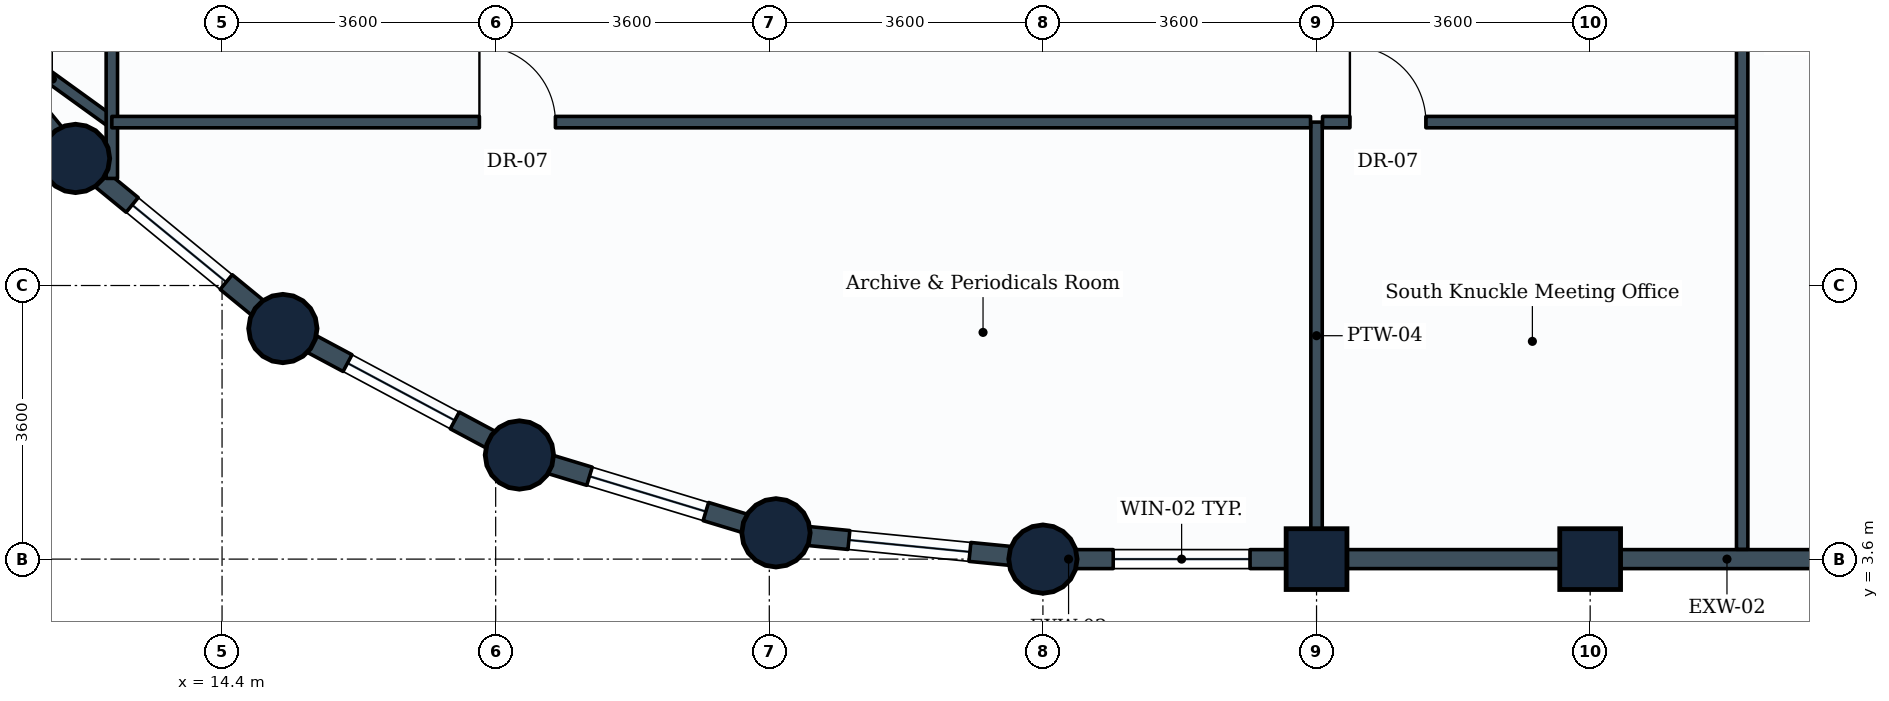
"""IFC4 building model, lengths in metres.
Left out: names, types, materials, properties, quantities, classifications, styles, units other than length and angle.
Written with IfcOpenShell. Run it as: python <this file> out.ifc"""

import sys

from ifc_helpers import new_model, si_unit, direction, frame, frame_2d, origin, origin_2d, place, context, subcontext, project, spatial, rectangle, circle, extrude, element, fill, save


model = new_model("IFC4")
c1 = context("Model", 3, precision=1e-05, world=origin(), true_north=direction((0.0, 1.0)))
c2 = subcontext(c1, "Body", "Model", "MODEL_VIEW")
j1 = project(units=[si_unit("LENGTHUNIT", "METRE"), si_unit("PLANEANGLEUNIT", "RADIAN")], contexts=[c1])
p1 = place(None, origin())
s1 = spatial("IfcSite", under=j1, at=p1, CompositionType="ELEMENT")
p2 = place(p1, origin())
s2 = spatial("IfcBuilding", under=s1, at=p2, CompositionType="ELEMENT")
p3 = place(p2, frame((0.0, 0.0, 259.4)))
s3 = spatial("IfcBuildingStorey", under=s2, at=p3, CompositionType="ELEMENT", Elevation=259.4)
for number, where, z_axis, x_axis in (
    (1, (12.472, 8.872, 0.0), (0.0, 0.0, 1.0), (1.0, 0.0, 0.0)),
    (2, (15.2, 6.634, 0.0), (0.0, 0.0, 1.0), (1.0, 0.0, 0.0)),
    (3, (18.312, 4.97, 0.0), (0.0, 0.0, 1.0), (1.0, 0.0, 0.0)),
    (4, (21.688, 3.946, 0.0), (0.0, 0.0, 1.0), (1.0, 0.0, 0.0)),
    (5, (25.2, 3.6, 0.0), (0.0, 0.0, 1.0), (1.0, 0.0, 0.0)),
):
    element("IfcColumn", number, at=place(p3, frame(where, z_axis=z_axis, x_axis=x_axis)), inside=s3, PredefinedType="COLUMN", context=c2, shape_type="SweptSolid", body=[
        extrude(circle(Radius=0.45, at=origin_2d()), origin(), (0.0, 0.0, 1.0), 3.6),
    ])
for number, where, z_axis, x_axis in (
    (6, (28.8, 3.6, 0.0), (0.0, 0.0, 1.0), (1.0, 0.0, 0.0)),
    (7, (32.4, 3.6, 0.0), (0.0, 0.0, 1.0), (1.0, 0.0, 0.0)),
):
    element("IfcColumn", number, at=place(p3, frame(where, z_axis=z_axis, x_axis=x_axis)), inside=s3, PredefinedType="COLUMN", context=c2, shape_type="SweptSolid", body=[
        extrude(rectangle(XDim=0.8, YDim=0.8, at=origin_2d()), origin(), (0.0, 0.0, 1.0), 3.6),
    ])
p4 = place(p3, frame((28.8, 3.6, 0.0), z_axis=(0.0, 0.0, 1.0), x_axis=(-1.0, 0.0, 0.0)))
e8 = element("IfcWall", 8, at=p4, inside=s3, PredefinedType="STANDARD", context=c2, shape_type="SweptSolid", body=[
    extrude(rectangle(XDim=3.6, YDim=0.25, at=frame_2d((1.8, 0.0))), origin(), (0.0, 0.0, 1.0), 2.83),
])
p5 = place(p4, frame((0.875, 0.0, 0.85)))
e9 = element("IfcOpeningElement", 9, at=p5, cuts=e8, PredefinedType="OPENING", context=c2, shape_type="SweptSolid", body=[
    extrude(rectangle(XDim=1.8, YDim=1.35, at=frame_2d((0.9, 0.675))), frame((0.0, 0.135, 0.0), z_axis=(0.0, -1.0, 0.0), x_axis=(1.0, 0.0, 0.0)), (0.0, 0.0, 1.0), 0.27),
])
p6 = place(p3, frame((32.4, 3.6, 0.0), z_axis=(0.0, 0.0, 1.0), x_axis=(-1.0, 0.0, 0.0)))
e10 = element("IfcWall", 10, at=p6, inside=s3, PredefinedType="STANDARD", context=c2, shape_type="SweptSolid", body=[
    extrude(rectangle(XDim=3.6, YDim=0.25, at=frame_2d((1.8, 0.0))), origin(), (0.0, 0.0, 1.0), 2.83),
])
p7 = place(p3, frame((36.0, 3.6, 0.0), z_axis=(0.0, 0.0, 1.0), x_axis=(-1.0, 0.0, 0.0)))
e11 = element("IfcWall", 11, at=p7, inside=s3, PredefinedType="STANDARD", context=c2, shape_type="SweptSolid", body=[
    extrude(rectangle(XDim=3.6, YDim=0.25, at=frame_2d((1.8, 0.0))), origin(), (0.0, 0.0, 1.0), 2.83),
])
p8 = place(p3, frame((12.472, 8.872, 0.0), z_axis=(0.0, 0.0, 1.0), x_axis=(-0.634258295121, 0.773121216285, 0.0)))
e12 = element("IfcWall", 12, at=p8, inside=s3, PredefinedType="STANDARD", context=c2, shape_type="SweptSolid", body=[
    extrude(rectangle(XDim=3.529, YDim=0.25, at=frame_2d((1.764, 0.0))), origin(), (0.0, 0.0, 1.0), 2.83),
])
p9 = place(p3, frame((15.2, 6.634, 0.0), z_axis=(0.0, 0.0, 1.0), x_axis=(-0.773121216285, 0.634258295121, 0.0)))
e13 = element("IfcWall", 13, at=p9, inside=s3, PredefinedType="STANDARD", context=c2, shape_type="SweptSolid", body=[
    extrude(rectangle(XDim=3.529, YDim=0.25, at=frame_2d((1.764, 0.0))), origin(), (0.0, 0.0, 1.0), 2.83),
])
p10 = place(p9, frame((0.964, 0.0, 0.85)))
e14 = element("IfcOpeningElement", 14, at=p10, cuts=e13, PredefinedType="OPENING", context=c2, shape_type="SweptSolid", body=[
    extrude(rectangle(XDim=1.6, YDim=1.35, at=frame_2d((0.8, 0.675))), frame((0.0, 0.135, 0.0), z_axis=(0.0, -1.0, 0.0), x_axis=(1.0, 0.0, 0.0)), (0.0, 0.0, 1.0), 0.27),
])
p11 = place(p3, frame((18.312, 4.97, 0.0), z_axis=(0.0, 0.0, 1.0), x_axis=(-0.881846862014, 0.471535907389, 0.0)))
e15 = element("IfcWall", 15, at=p11, inside=s3, PredefinedType="STANDARD", context=c2, shape_type="SweptSolid", body=[
    extrude(rectangle(XDim=3.529, YDim=0.25, at=frame_2d((1.765, 0.0))), origin(), (0.0, 0.0, 1.0), 2.83),
])
p12 = place(p11, frame((0.964, 0.0, 0.85)))
e16 = element("IfcOpeningElement", 16, at=p12, cuts=e15, PredefinedType="OPENING", context=c2, shape_type="SweptSolid", body=[
    extrude(rectangle(XDim=1.6, YDim=1.35, at=frame_2d((0.8, 0.675))), frame((0.0, 0.135, 0.0), z_axis=(0.0, -1.0, 0.0), x_axis=(1.0, 0.0, 0.0)), (0.0, 0.0, 1.0), 0.27),
])
p13 = place(p3, frame((21.688, 3.946, 0.0), z_axis=(0.0, 0.0, 1.0), x_axis=(-0.956953367403, 0.290241714123, 0.0)))
e17 = element("IfcWall", 17, at=p13, inside=s3, PredefinedType="STANDARD", context=c2, shape_type="SweptSolid", body=[
    extrude(rectangle(XDim=3.528, YDim=0.25, at=frame_2d((1.764, 0.0))), origin(), (0.0, 0.0, 1.0), 2.83),
])
p14 = place(p13, frame((0.964, 0.0, 0.85)))
e18 = element("IfcOpeningElement", 18, at=p14, cuts=e17, PredefinedType="OPENING", context=c2, shape_type="SweptSolid", body=[
    extrude(rectangle(XDim=1.6, YDim=1.35, at=frame_2d((0.8, 0.675))), frame((0.0, 0.135, 0.0), z_axis=(0.0, -1.0, 0.0), x_axis=(1.0, 0.0, 0.0)), (0.0, 0.0, 1.0), 0.27),
])
p15 = place(p3, frame((25.2, 3.6, 0.0), z_axis=(0.0, 0.0, 1.0), x_axis=(-0.995183369056, 0.098030923459, 0.0)))
e19 = element("IfcWall", 19, at=p15, inside=s3, PredefinedType="STANDARD", context=c2, shape_type="SweptSolid", body=[
    extrude(rectangle(XDim=3.529, YDim=0.25, at=frame_2d((1.765, 0.0))), origin(), (0.0, 0.0, 1.0), 2.83),
])
p16 = place(p15, frame((0.965, 0.0, 0.85)))
e20 = element("IfcOpeningElement", 20, at=p16, cuts=e19, PredefinedType="OPENING", context=c2, shape_type="SweptSolid", body=[
    extrude(rectangle(XDim=1.6, YDim=1.35, at=frame_2d((0.8, 0.675))), frame((0.0, 0.135, 0.0), z_axis=(0.0, -1.0, 0.0), x_axis=(1.0, 0.0, 0.0)), (0.0, 0.0, 1.0), 0.27),
])
p17 = place(p3, frame((28.8, 9.35, 0.0), z_axis=(0.0, 0.0, 1.0), x_axis=(0.0, -1.0, 0.0)))
e21 = element("IfcWall", 21, at=p17, inside=s3, PredefinedType="PARTITIONING", context=c2, shape_type="SweptSolid", body=[
    extrude(rectangle(XDim=5.621, YDim=0.15, at=frame_2d((2.811, 0.0))), origin(), (0.0, 0.0, 1.0), 3.335),
])
p18 = place(p3, frame((12.95, 9.35, 0.0), z_axis=(0.0, 0.0, 1.0), x_axis=(-0.8106792284, 0.585490553844, 0.0)))
e22 = element("IfcWall", 22, at=p18, inside=s3, PredefinedType="PARTITIONING", context=c2, shape_type="SweptSolid", body=[
    extrude(rectangle(XDim=1.93, YDim=0.15, at=frame_2d((0.965, 0.0))), origin(), (0.0, 0.0, 1.0), 2.83),
])
p19 = place(p3, frame((12.95, 8.609, 0.0), z_axis=(0.0, 0.0, 1.0), x_axis=(0.0, 1.0, 0.0)))
e23 = element("IfcWall", 23, at=p19, inside=s3, PredefinedType="PARTITIONING", context=c2, shape_type="SweptSolid", body=[
    extrude(rectangle(XDim=7.652, YDim=0.15, at=frame_2d((3.826, 0.0))), origin(), (0.0, 0.0, 1.0), 2.83),
])
p20 = place(p19, frame((4.972, 0.0, 0.0)))
e24 = element("IfcOpeningElement", 24, at=p20, cuts=e23, PredefinedType="OPENING", context=c2, shape_type="SweptSolid", body=[
    extrude(rectangle(XDim=1.0, YDim=2.1, at=frame_2d((0.5, 1.05))), frame((0.0, 0.085, 0.0), z_axis=(0.0, -1.0, 0.0), x_axis=(1.0, 0.0, 0.0)), (0.0, 0.0, 1.0), 0.17),
])
p21 = place(p3, frame((12.95, 9.35, 0.0), z_axis=(0.0, 0.0, 1.0), x_axis=(1.0, 0.0, 0.0)))
e25 = element("IfcWall", 25, at=p21, inside=s3, PredefinedType="PARTITIONING", context=c2, shape_type="SweptSolid", body=[
    extrude(rectangle(XDim=15.771, YDim=0.15, at=frame_2d((7.885, 0.0))), origin(), (0.0, 0.0, 1.0), 3.02),
])
p22 = place(p21, frame((4.836, 0.0, 0.0)))
e26 = element("IfcOpeningElement", 26, at=p22, cuts=e25, PredefinedType="OPENING", context=c2, shape_type="SweptSolid", body=[
    extrude(rectangle(XDim=1.0, YDim=2.1, at=frame_2d((0.5, 1.05))), frame((0.0, 0.085, 0.0), z_axis=(0.0, -1.0, 0.0), x_axis=(1.0, 0.0, 0.0)), (0.0, 0.0, 1.0), 0.17),
])
p23 = place(p3, frame((28.879, 9.35, 0.0), z_axis=(0.0, 0.0, 1.0), x_axis=(1.0, 0.0, 0.0)))
e27 = element("IfcWall", 27, at=p23, inside=s3, PredefinedType="PARTITIONING", context=c2, shape_type="SweptSolid", body=[
    extrude(rectangle(XDim=5.521, YDim=0.15, at=frame_2d((2.76, 0.0))), origin(), (0.0, 0.0, 1.0), 3.335),
])
p24 = place(p23, frame((0.36, 0.0, 0.0)))
e28 = element("IfcOpeningElement", 28, at=p24, cuts=e27, PredefinedType="OPENING", context=c2, shape_type="SweptSolid", body=[
    extrude(rectangle(XDim=1.0, YDim=2.1, at=frame_2d((0.5, 1.05))), frame((0.0, 0.085, 0.0), z_axis=(0.0, -1.0, 0.0), x_axis=(1.0, 0.0, 0.0)), (0.0, 0.0, 1.0), 0.17),
])
p25 = place(p3, frame((34.4, 3.729, 0.0), z_axis=(0.0, 0.0, 1.0), x_axis=(0.0, 1.0, 0.0)))
e29 = element("IfcWall", 29, at=p25, inside=s3, PredefinedType="PARTITIONING", context=c2, shape_type="SweptSolid", body=[
    extrude(rectangle(XDim=12.571, YDim=0.15, at=frame_2d((6.286, 0.0))), origin(), (0.0, 0.0, 1.0), 2.83),
])
p26 = place(p5, origin())
e30 = element("IfcWindow", 30, at=p26, inside=s3, PartitioningType="SINGLE_PANEL", PredefinedType="WINDOW", context=c2, shape_type="SweptSolid", body=[
    extrude(rectangle(XDim=1.8, YDim=1.35, at=frame_2d((0.9, 0.675))), frame((0.0, 0.03, 0.0), z_axis=(0.0, -1.0, 0.0), x_axis=(1.0, 0.0, 0.0)), (0.0, 0.0, 1.0), 0.06),
])
fill(e9, e30)
p27 = place(p10, origin())
e31 = element("IfcWindow", 31, at=p27, inside=s3, PartitioningType="SINGLE_PANEL", PredefinedType="WINDOW", context=c2, shape_type="SweptSolid", body=[
    extrude(rectangle(XDim=1.6, YDim=1.35, at=frame_2d((0.8, 0.675))), frame((0.0, 0.03, 0.0), z_axis=(0.0, -1.0, 0.0), x_axis=(1.0, 0.0, 0.0)), (0.0, 0.0, 1.0), 0.06),
])
fill(e14, e31)
p28 = place(p12, origin())
e32 = element("IfcWindow", 32, at=p28, inside=s3, PartitioningType="SINGLE_PANEL", PredefinedType="WINDOW", context=c2, shape_type="SweptSolid", body=[
    extrude(rectangle(XDim=1.6, YDim=1.35, at=frame_2d((0.8, 0.675))), frame((0.0, 0.03, 0.0), z_axis=(0.0, -1.0, 0.0), x_axis=(1.0, 0.0, 0.0)), (0.0, 0.0, 1.0), 0.06),
])
fill(e16, e32)
p29 = place(p14, origin())
e33 = element("IfcWindow", 33, at=p29, inside=s3, PartitioningType="SINGLE_PANEL", PredefinedType="WINDOW", context=c2, shape_type="SweptSolid", body=[
    extrude(rectangle(XDim=1.6, YDim=1.35, at=frame_2d((0.8, 0.675))), frame((0.0, 0.03, 0.0), z_axis=(0.0, -1.0, 0.0), x_axis=(1.0, 0.0, 0.0)), (0.0, 0.0, 1.0), 0.06),
])
fill(e18, e33)
p30 = place(p16, origin())
e34 = element("IfcWindow", 34, at=p30, inside=s3, PartitioningType="SINGLE_PANEL", PredefinedType="WINDOW", context=c2, shape_type="SweptSolid", body=[
    extrude(rectangle(XDim=1.6, YDim=1.35, at=frame_2d((0.8, 0.675))), frame((0.0, 0.03, 0.0), z_axis=(0.0, -1.0, 0.0), x_axis=(1.0, 0.0, 0.0)), (0.0, 0.0, 1.0), 0.06),
])
fill(e20, e34)
p31 = place(p22, origin())
e35 = element("IfcDoor", 35, at=p31, inside=s3, OperationType="SINGLE_SWING_LEFT", PredefinedType="DOOR", context=c2, shape_type="SweptSolid", body=[
    extrude(rectangle(XDim=1.0, YDim=2.1, at=frame_2d((0.5, 1.05))), frame((0.0, 0.025, 0.0), z_axis=(0.0, -1.0, 0.0), x_axis=(1.0, 0.0, 0.0)), (0.0, 0.0, 1.0), 0.05),
])
fill(e26, e35)
p32 = place(p24, origin())
e36 = element("IfcDoor", 36, at=p32, inside=s3, OperationType="SINGLE_SWING_LEFT", PredefinedType="DOOR", context=c2, shape_type="SweptSolid", body=[
    extrude(rectangle(XDim=1.0, YDim=2.1, at=frame_2d((0.5, 1.05))), frame((0.0, 0.025, 0.0), z_axis=(0.0, -1.0, 0.0), x_axis=(1.0, 0.0, 0.0)), (0.0, 0.0, 1.0), 0.05),
])
fill(e28, e36)
save(model, sys.argv[1])
